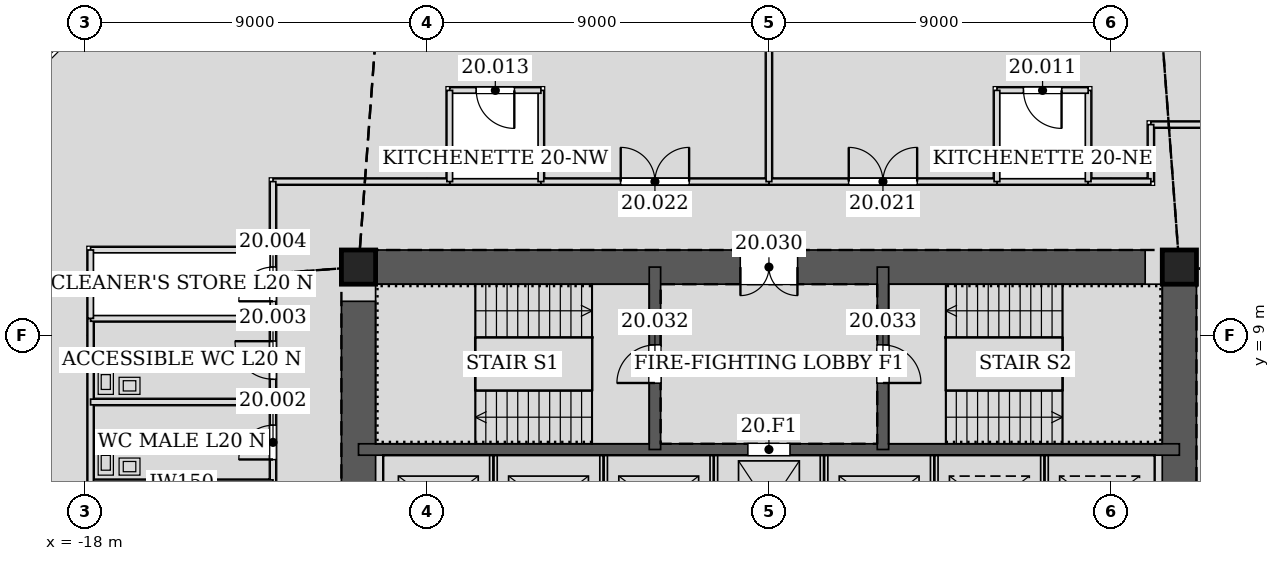
"""IFC4 building model, lengths in metres.
Left out: names, types, materials, properties, quantities, classifications, styles, units other than length and angle.
Written with IfcOpenShell. Run it as: python <this file> out.ifc"""

import sys

from ifc_helpers import new_model, si_unit, direction, frame, frame_2d, origin, origin_2d, place, context, subcontext, project, spatial, rectangle, hollow_rectangle, extrude, element, fill, save


model = new_model("IFC4")
c1 = context("Model", 3, precision=1e-05, world=origin(), true_north=direction((0.0, 1.0)))
c2 = subcontext(c1, "Body", "Model", "MODEL_VIEW")
j1 = project(units=[si_unit("LENGTHUNIT", "METRE"), si_unit("PLANEANGLEUNIT", "RADIAN")], contexts=[c1])
p1 = place(None, origin())
s1 = spatial("IfcSite", under=j1, at=p1, CompositionType="ELEMENT")
p2 = place(p1, origin())
s2 = spatial("IfcBuilding", under=s1, at=p2, CompositionType="ELEMENT")
p3 = place(p2, frame((0.0, 0.0, 91.8)))
s3 = spatial("IfcBuildingStorey", under=s2, at=p3, CompositionType="ELEMENT", Elevation=91.8)
for number, where, z_axis, x_axis in (
    (1, (10.8, 10.8, 0.0), (0.0, 0.0, 1.0), (1.0, 0.0, 0.0)),
    (2, (-10.8, 10.8, 0.0), (0.0, 0.0, 1.0), (1.0, 0.0, 0.0)),
):
    element("IfcColumn", number, at=place(p3, frame(where, z_axis=z_axis, x_axis=x_axis)), inside=s3, PredefinedType="COLUMN", context=c2, shape_type="SweptSolid", body=[
        extrude(hollow_rectangle(XDim=0.9, YDim=0.9, WallThickness=0.06, at=origin_2d()), origin(), (0.0, 0.0, 1.0), 4.2),
    ])
p4 = place(p3, frame((10.8, -10.8, 0.0), z_axis=(0.0, 0.0, 1.0), x_axis=(0.0, 1.0, 0.0)))
e3 = element("IfcWall", 3, at=p4, inside=s3, PredefinedType="SOLIDWALL", context=c2, shape_type="SweptSolid", body=[
    extrude(rectangle(XDim=21.6, YDim=0.9, at=frame_2d((10.8, 0.0))), origin(), (0.0, 0.0, 1.0), 4.2),
])
p5 = place(p4, frame((11.7, 0.0, 0.0)))
e4 = element("IfcOpeningElement", 4, at=p5, cuts=e3, PredefinedType="OPENING", context=c2, shape_type="SweptSolid", body=[
    extrude(rectangle(XDim=1.2, YDim=2.1, at=frame_2d((0.6, 1.05))), frame((0.0, 0.46, 0.0), z_axis=(0.0, -1.0, 0.0), x_axis=(1.0, 0.0, 0.0)), (0.0, 0.0, 1.0), 0.92),
])
p6 = place(p4, frame((8.7, 0.0, 0.0)))
e5 = element("IfcOpeningElement", 5, at=p6, cuts=e3, PredefinedType="OPENING", context=c2, shape_type="SweptSolid", body=[
    extrude(rectangle(XDim=1.2, YDim=2.1, at=frame_2d((0.6, 1.05))), frame((0.0, 0.46, 0.0), z_axis=(0.0, -1.0, 0.0), x_axis=(1.0, 0.0, 0.0)), (0.0, 0.0, 1.0), 0.92),
])
p7 = place(p3, frame((10.8, 10.8, 0.0), z_axis=(0.0, 0.0, 1.0), x_axis=(-1.0, 0.0, 0.0)))
e6 = element("IfcWall", 6, at=p7, inside=s3, PredefinedType="SOLIDWALL", context=c2, shape_type="SweptSolid", body=[
    extrude(rectangle(XDim=21.6, YDim=0.9, at=frame_2d((10.8, 0.0))), origin(), (0.0, 0.0, 1.0), 4.2),
])
p8 = place(p7, frame((10.05, 0.0, 0.0)))
e7 = element("IfcOpeningElement", 7, at=p8, cuts=e6, PredefinedType="OPENING", context=c2, shape_type="SweptSolid", body=[
    extrude(rectangle(XDim=1.5, YDim=2.1, at=frame_2d((0.75, 1.05))), frame((0.0, 0.46, 0.0), z_axis=(0.0, -1.0, 0.0), x_axis=(1.0, 0.0, 0.0)), (0.0, 0.0, 1.0), 0.92),
])
p9 = place(p3, frame((-10.8, 10.8, 0.0), z_axis=(0.0, 0.0, 1.0), x_axis=(0.0, -1.0, 0.0)))
e8 = element("IfcWall", 8, at=p9, inside=s3, PredefinedType="SOLIDWALL", context=c2, shape_type="SweptSolid", body=[
    extrude(rectangle(XDim=21.6, YDim=0.9, at=frame_2d((10.8, 0.0))), origin(), (0.0, 0.0, 1.0), 4.2),
])
p10 = place(p9, frame((8.7, 0.0, 0.0)))
e9 = element("IfcOpeningElement", 9, at=p10, cuts=e8, PredefinedType="OPENING", context=c2, shape_type="SweptSolid", body=[
    extrude(rectangle(XDim=1.2, YDim=2.1, at=frame_2d((0.6, 1.05))), frame((0.0, 0.46, 0.0), z_axis=(0.0, -1.0, 0.0), x_axis=(1.0, 0.0, 0.0)), (0.0, 0.0, 1.0), 0.92),
])
p11 = place(p9, frame((11.7, 0.0, 0.0)))
e10 = element("IfcOpeningElement", 10, at=p11, cuts=e8, PredefinedType="OPENING", context=c2, shape_type="SweptSolid", body=[
    extrude(rectangle(XDim=1.2, YDim=2.1, at=frame_2d((0.6, 1.05))), frame((0.0, 0.46, 0.0), z_axis=(0.0, -1.0, 0.0), x_axis=(1.0, 0.0, 0.0)), (0.0, 0.0, 1.0), 0.92),
])
p12 = place(p3, frame((-10.8, 6.0, 0.0), z_axis=(0.0, 0.0, 1.0), x_axis=(1.0, 0.0, 0.0)))
e11 = element("IfcWall", 11, at=p12, inside=s3, PredefinedType="SOLIDWALL", context=c2, shape_type="SweptSolid", body=[
    extrude(rectangle(XDim=21.6, YDim=0.3, at=frame_2d((10.8, 0.0))), origin(), (0.0, 0.0, 1.0), 4.2),
])
p13 = place(p12, frame((10.25, 0.0, 0.0)))
e12 = element("IfcOpeningElement", 12, at=p13, cuts=e11, PredefinedType="OPENING", context=c2, shape_type="SweptSolid", body=[
    extrude(rectangle(XDim=1.1, YDim=2.1, at=frame_2d((0.55, 1.05))), frame((0.0, 0.16, 0.0), z_axis=(0.0, -1.0, 0.0), x_axis=(1.0, 0.0, 0.0)), (0.0, 0.0, 1.0), 0.32),
])
p14 = place(p3, frame((-3.0, 6.0, 0.0), z_axis=(0.0, 0.0, 1.0), x_axis=(0.0, 1.0, 0.0)))
e13 = element("IfcWall", 13, at=p14, inside=s3, PredefinedType="SOLIDWALL", context=c2, shape_type="SweptSolid", body=[
    extrude(rectangle(XDim=4.8, YDim=0.3, at=frame_2d((2.4, 0.0))), origin(), (0.0, 0.0, 1.0), 4.2),
])
p15 = place(p14, frame((1.75, 0.0, 0.0)))
e14 = element("IfcOpeningElement", 14, at=p15, cuts=e13, PredefinedType="OPENING", context=c2, shape_type="SweptSolid", body=[
    extrude(rectangle(XDim=1.0, YDim=2.1, at=frame_2d((0.5, 1.05))), frame((0.0, 0.16, 0.0), z_axis=(0.0, -1.0, 0.0), x_axis=(1.0, 0.0, 0.0)), (0.0, 0.0, 1.0), 0.32),
])
p16 = place(p3, frame((3.0, 6.0, 0.0), z_axis=(0.0, 0.0, 1.0), x_axis=(0.0, 1.0, 0.0)))
e15 = element("IfcWall", 15, at=p16, inside=s3, PredefinedType="SOLIDWALL", context=c2, shape_type="SweptSolid", body=[
    extrude(rectangle(XDim=4.8, YDim=0.3, at=frame_2d((2.4, 0.0))), origin(), (0.0, 0.0, 1.0), 4.2),
])
p17 = place(p16, frame((1.75, 0.0, 0.0)))
e16 = element("IfcOpeningElement", 16, at=p17, cuts=e15, PredefinedType="OPENING", context=c2, shape_type="SweptSolid", body=[
    extrude(rectangle(XDim=1.0, YDim=2.1, at=frame_2d((0.5, 1.05))), frame((0.0, 0.16, 0.0), z_axis=(0.0, -1.0, 0.0), x_axis=(1.0, 0.0, 0.0)), (0.0, 0.0, 1.0), 0.32),
])
p18 = place(p3, frame((-13.05, 7.251, 0.0), z_axis=(0.0, 0.0, 1.0), x_axis=(0.0, -1.0, 0.0)))
e17 = element("IfcWall", 17, at=p18, inside=s3, PredefinedType="PARTITIONING", context=c2, shape_type="SweptSolid", body=[
    extrude(rectangle(XDim=2.127, YDim=0.15, at=frame_2d((1.063, 0.0))), origin(), (0.0, 0.0, 1.0), 4.035),
])
p19 = place(p18, frame((0.614, 0.0, 0.0)))
e18 = element("IfcOpeningElement", 18, at=p19, cuts=e17, PredefinedType="OPENING", context=c2, shape_type="SweptSolid", body=[
    extrude(rectangle(XDim=0.9, YDim=2.1, at=frame_2d((0.45, 1.05))), frame((0.0, 0.085, 0.0), z_axis=(0.0, -1.0, 0.0), x_axis=(1.0, 0.0, 0.0)), (0.0, 0.0, 1.0), 0.17),
])
p20 = place(p3, frame((-13.05, 9.451, 0.0), z_axis=(0.0, 0.0, 1.0), x_axis=(0.0, -1.0, 0.0)))
e19 = element("IfcWall", 19, at=p20, inside=s3, PredefinedType="PARTITIONING", context=c2, shape_type="SweptSolid", body=[
    extrude(rectangle(XDim=2.202, YDim=0.15, at=frame_2d((1.101, 0.0))), origin(), (0.0, 0.0, 1.0), 4.035),
])
p21 = place(p20, frame((0.601, 0.0, 0.0)))
e20 = element("IfcOpeningElement", 20, at=p21, cuts=e19, PredefinedType="OPENING", context=c2, shape_type="SweptSolid", body=[
    extrude(rectangle(XDim=1.0, YDim=2.1, at=frame_2d((0.5, 1.05))), frame((0.0, 0.085, 0.0), z_axis=(0.0, -1.0, 0.0), x_axis=(1.0, 0.0, 0.0)), (0.0, 0.0, 1.0), 0.17),
])
p22 = place(p3, frame((-13.05, 11.251, 0.0), z_axis=(0.0, 0.0, 1.0), x_axis=(0.0, -1.0, 0.0)))
e21 = element("IfcWall", 21, at=p22, inside=s3, PredefinedType="PARTITIONING", context=c2, shape_type="SweptSolid", body=[
    extrude(rectangle(XDim=1.802, YDim=0.15, at=frame_2d((0.901, 0.0))), origin(), (0.0, 0.0, 1.0), 3.014),
])
p23 = place(p22, frame((0.451, 0.0, 0.0)))
e22 = element("IfcOpeningElement", 22, at=p23, cuts=e21, PredefinedType="OPENING", context=c2, shape_type="SweptSolid", body=[
    extrude(rectangle(XDim=0.9, YDim=2.1, at=frame_2d((0.45, 1.05))), frame((0.0, 0.085, 0.0), z_axis=(0.0, -1.0, 0.0), x_axis=(1.0, 0.0, 0.0)), (0.0, 0.0, 1.0), 0.17),
])
for number, where, z_axis, x_axis in (
    (23, (8.401, 13.05, 0.0), (0.0, 0.0, 1.0), (-1.0, 0.0, 0.0)),
    (24, (-5.999, 13.05, 0.0), (0.0, 0.0, 1.0), (-1.0, 0.0, 0.0)),
):
    element("IfcWall", number, at=place(p3, frame(where, z_axis=z_axis, x_axis=x_axis)), inside=s3, PredefinedType="PARTITIONING", context=c2, shape_type="SweptSolid", body=[
        extrude(rectangle(XDim=2.402, YDim=0.15, at=frame_2d((1.201, 0.0))), origin(), (0.0, 0.0, 1.0), 4.035),
    ])
p24 = place(p3, frame((6.001, 13.05, 0.0), z_axis=(0.0, 0.0, 1.0), x_axis=(-1.0, 0.0, 0.0)))
e25 = element("IfcWall", 25, at=p24, inside=s3, PredefinedType="PARTITIONING", context=c2, shape_type="SweptSolid", body=[
    extrude(rectangle(XDim=6.002, YDim=0.15, at=frame_2d((3.001, 0.0))), origin(), (0.0, 0.0, 1.0), 3.065),
])
p25 = place(p24, frame((2.101, 0.0, 0.0)))
e26 = element("IfcOpeningElement", 26, at=p25, cuts=e25, PredefinedType="OPENING", context=c2, shape_type="SweptSolid", body=[
    extrude(rectangle(XDim=1.8, YDim=2.4, at=frame_2d((0.9, 1.2))), frame((0.0, 0.085, 0.0), z_axis=(0.0, -1.0, 0.0), x_axis=(1.0, 0.0, 0.0)), (0.0, 0.0, 1.0), 0.17),
])
p26 = place(p3, frame((14.55, 14.55, 0.0), z_axis=(0.0, 0.0, 1.0), x_axis=(-1.0, 0.0, 0.0)))
e27 = element("IfcWall", 27, at=p26, inside=s3, PredefinedType="PARTITIONING", context=c2, shape_type="SweptSolid", body=[
    extrude(rectangle(XDim=4.5, YDim=0.15, at=frame_2d((2.25, 0.0))), origin(), (0.0, 0.0, 1.0), 3.014),
])
p27 = place(p3, frame((10.05, 14.55, 0.0), z_axis=(0.0, 0.0, 1.0), x_axis=(0.0, -1.0, 0.0)))
e28 = element("IfcWall", 28, at=p27, inside=s3, PredefinedType="PARTITIONING", context=c2, shape_type="SweptSolid", body=[
    extrude(rectangle(XDim=1.5, YDim=0.15, at=frame_2d((0.75, 0.0))), origin(), (0.0, 0.0, 1.0), 3.491),
])
p28 = place(p3, frame((10.05, 13.05, 0.0), z_axis=(0.0, 0.0, 1.0), x_axis=(-1.0, 0.0, 0.0)))
e29 = element("IfcWall", 29, at=p28, inside=s3, PredefinedType="PARTITIONING", context=c2, shape_type="SweptSolid", body=[
    extrude(rectangle(XDim=1.651, YDim=0.15, at=frame_2d((0.826, 0.0))), origin(), (0.0, 0.0, 1.0), 4.035),
])
p29 = place(p3, frame((-8.399, 13.05, 0.0), z_axis=(0.0, 0.0, 1.0), x_axis=(-1.0, 0.0, 0.0)))
e30 = element("IfcWall", 30, at=p29, inside=s3, PredefinedType="PARTITIONING", context=c2, shape_type="SweptSolid", body=[
    extrude(rectangle(XDim=4.651, YDim=0.15, at=frame_2d((2.326, 0.0))), origin(), (0.0, 0.0, 1.0), 3.014),
])
p30 = place(p3, frame((-13.05, 13.05, 0.0), z_axis=(0.0, 0.0, 1.0), x_axis=(0.0, -1.0, 0.0)))
e31 = element("IfcWall", 31, at=p30, inside=s3, PredefinedType="PARTITIONING", context=c2, shape_type="SweptSolid", body=[
    extrude(rectangle(XDim=1.801, YDim=0.15, at=frame_2d((0.9, 0.0))), origin(), (0.0, 0.0, 1.0), 3.179),
])
p31 = place(p3, frame((0.001, 13.05, 0.0), z_axis=(0.0, 0.0, 1.0), x_axis=(-1.0, 0.0, 0.0)))
e32 = element("IfcWall", 32, at=p31, inside=s3, PredefinedType="PARTITIONING", context=c2, shape_type="SweptSolid", body=[
    extrude(rectangle(XDim=6.002, YDim=0.15, at=frame_2d((3.001, 0.0))), origin(), (0.0, 0.0, 1.0), 3.065),
])
p32 = place(p31, frame((2.101, 0.0, 0.0)))
e33 = element("IfcOpeningElement", 33, at=p32, cuts=e32, PredefinedType="OPENING", context=c2, shape_type="SweptSolid", body=[
    extrude(rectangle(XDim=1.8, YDim=2.4, at=frame_2d((0.9, 1.2))), frame((0.0, 0.085, 0.0), z_axis=(0.0, -1.0, 0.0), x_axis=(1.0, 0.0, 0.0)), (0.0, 0.0, 1.0), 0.17),
])
p33 = place(p3, frame((-13.05, 5.125, 0.0), z_axis=(0.0, 0.0, 1.0), x_axis=(-1.0, 0.0, 0.0)))
e34 = element("IfcWall", 34, at=p33, inside=s3, PredefinedType="PARTITIONING", context=c2, shape_type="SweptSolid", body=[
    extrude(rectangle(XDim=4.8, YDim=0.15, at=frame_2d((2.4, 0.0))), origin(), (0.0, 0.0, 1.0), 3.491),
])
p34 = place(p3, frame((-17.85, 3.0, 0.0), z_axis=(0.0, 0.0, 1.0), x_axis=(0.0, 1.0, 0.0)))
e35 = element("IfcWall", 35, at=p34, inside=s3, PredefinedType="PARTITIONING", context=c2, shape_type="SweptSolid", body=[
    extrude(rectangle(XDim=6.45, YDim=0.15, at=frame_2d((3.225, 0.0))), origin(), (0.0, 0.0, 1.0), 4.035),
])
for number, where, z_axis, x_axis in (
    (36, (-13.05, 7.25, 0.0), (0.0, 0.0, 1.0), (-1.0, 0.0, 0.0)),
    (37, (-13.05, 9.45, 0.0), (0.0, 0.0, 1.0), (-1.0, 0.0, 0.0)),
):
    element("IfcWall", number, at=place(p3, frame(where, z_axis=z_axis, x_axis=x_axis)), inside=s3, PredefinedType="PARTITIONING", context=c2, shape_type="SweptSolid", body=[
        extrude(rectangle(XDim=4.8, YDim=0.15, at=frame_2d((2.4, 0.0))), origin(), (0.0, 0.0, 1.0), 3.491),
    ])
p35 = place(p3, frame((-13.05, 11.25, 0.0), z_axis=(0.0, 0.0, 1.0), x_axis=(-1.0, 0.0, 0.0)))
e38 = element("IfcWall", 38, at=p35, inside=s3, PredefinedType="PARTITIONING", context=c2, shape_type="SweptSolid", body=[
    extrude(rectangle(XDim=4.8, YDim=0.15, at=frame_2d((2.4, 0.0))), origin(), (0.0, 0.0, 1.0), 3.715),
])
p36 = place(p3, frame((-17.85, 11.25, 0.0), z_axis=(0.0, 0.0, 1.0), x_axis=(0.0, -1.0, 0.0)))
e39 = element("IfcWall", 39, at=p36, inside=s3, PredefinedType="PARTITIONING", context=c2, shape_type="SweptSolid", body=[
    extrude(rectangle(XDim=1.8, YDim=0.15, at=frame_2d((0.9, 0.0))), origin(), (0.0, 0.0, 1.0), 3.014),
])
p37 = place(p3, frame((8.4, 13.05, 0.0), z_axis=(0.0, 0.0, 1.0), x_axis=(0.0, 1.0, 0.0)))
e40 = element("IfcWall", 40, at=p37, inside=s3, PredefinedType="PARTITIONING", context=c2, shape_type="SweptSolid", body=[
    extrude(rectangle(XDim=2.4, YDim=0.15, at=frame_2d((1.2, 0.0))), origin(), (0.0, 0.0, 1.0), 3.491),
])
p38 = place(p3, frame((8.4, 15.45, 0.0), z_axis=(0.0, 0.0, 1.0), x_axis=(-1.0, 0.0, 0.0)))
e41 = element("IfcWall", 41, at=p38, inside=s3, PredefinedType="PARTITIONING", context=c2, shape_type="SweptSolid", body=[
    extrude(rectangle(XDim=2.4, YDim=0.15, at=frame_2d((1.2, 0.0))), origin(), (0.0, 0.0, 1.0), 4.035),
])
p39 = place(p38, frame((0.7, 0.0, 0.0)))
e42 = element("IfcOpeningElement", 42, at=p39, cuts=e41, PredefinedType="OPENING", context=c2, shape_type="SweptSolid", body=[
    extrude(rectangle(XDim=1.0, YDim=2.1, at=frame_2d((0.5, 1.05))), frame((0.0, 0.085, 0.0), z_axis=(0.0, -1.0, 0.0), x_axis=(1.0, 0.0, 0.0)), (0.0, 0.0, 1.0), 0.17),
])
for number, where, z_axis, x_axis in (
    (43, (6.0, 15.45, 0.0), (0.0, 0.0, 1.0), (0.0, -1.0, 0.0)),
    (44, (-6.0, 13.05, 0.0), (0.0, 0.0, 1.0), (0.0, 1.0, 0.0)),
):
    element("IfcWall", number, at=place(p3, frame(where, z_axis=z_axis, x_axis=x_axis)), inside=s3, PredefinedType="PARTITIONING", context=c2, shape_type="SweptSolid", body=[
        extrude(rectangle(XDim=2.4, YDim=0.15, at=frame_2d((1.2, 0.0))), origin(), (0.0, 0.0, 1.0), 3.491),
    ])
p40 = place(p3, frame((-6.0, 15.45, 0.0), z_axis=(0.0, 0.0, 1.0), x_axis=(-1.0, 0.0, 0.0)))
e45 = element("IfcWall", 45, at=p40, inside=s3, PredefinedType="PARTITIONING", context=c2, shape_type="SweptSolid", body=[
    extrude(rectangle(XDim=2.4, YDim=0.15, at=frame_2d((1.2, 0.0))), origin(), (0.0, 0.0, 1.0), 4.035),
])
p41 = place(p40, frame((0.7, 0.0, 0.0)))
e46 = element("IfcOpeningElement", 46, at=p41, cuts=e45, PredefinedType="OPENING", context=c2, shape_type="SweptSolid", body=[
    extrude(rectangle(XDim=1.0, YDim=2.1, at=frame_2d((0.5, 1.05))), frame((0.0, 0.085, 0.0), z_axis=(0.0, -1.0, 0.0), x_axis=(1.0, 0.0, 0.0)), (0.0, 0.0, 1.0), 0.17),
])
p42 = place(p3, frame((-8.4, 15.45, 0.0), z_axis=(0.0, 0.0, 1.0), x_axis=(0.0, -1.0, 0.0)))
e47 = element("IfcWall", 47, at=p42, inside=s3, PredefinedType="PARTITIONING", context=c2, shape_type="SweptSolid", body=[
    extrude(rectangle(XDim=2.4, YDim=0.15, at=frame_2d((1.2, 0.0))), origin(), (0.0, 0.0, 1.0), 3.491),
])
p43 = place(p3, frame((0.0, 24.23, 0.0), z_axis=(0.0, 0.0, 1.0), x_axis=(0.0, -1.0, 0.0)))
e48 = element("IfcWall", 48, at=p43, inside=s3, PredefinedType="PARTITIONING", context=c2, shape_type="SweptSolid", body=[
    extrude(rectangle(XDim=11.18, YDim=0.15, at=frame_2d((5.59, 0.0))), origin(), (0.0, 0.0, 1.0), 3.065),
])
for number, where, z_axis, x_axis in (
    (49, (-7.25, 3.15, 0.0), (0.0, 0.0, 1.0), (0.0, 1.0, 0.0)),
    (50, (-4.35, 3.15, 0.0), (0.0, 0.0, 1.0), (0.0, 1.0, 0.0)),
    (51, (-1.45, 3.15, 0.0), (0.0, 0.0, 1.0), (0.0, 1.0, 0.0)),
    (52, (1.45, 3.15, 0.0), (0.0, 0.0, 1.0), (0.0, 1.0, 0.0)),
    (53, (4.35, 3.15, 0.0), (0.0, 0.0, 1.0), (0.0, 1.0, 0.0)),
    (54, (7.25, 3.15, 0.0), (0.0, 0.0, 1.0), (0.0, 1.0, 0.0)),
):
    element("IfcWall", number, at=place(p3, frame(where, z_axis=z_axis, x_axis=x_axis)), inside=s3, PredefinedType="PARTITIONING", context=c2, shape_type="SweptSolid", body=[
        extrude(rectangle(XDim=2.7, YDim=0.2, at=frame_2d((1.35, 0.0))), origin(), (0.0, 0.0, 1.0), 4.2),
    ])
p44 = place(p19, frame((0.9, 0.0, 0.0), z_axis=(0.0, 0.0, 1.0), x_axis=(-1.0, 0.0, 0.0)))
e55 = element("IfcDoor", 55, at=p44, inside=s3, OperationType="SINGLE_SWING_LEFT", PredefinedType="DOOR", context=c2, shape_type="SweptSolid", body=[
    extrude(rectangle(XDim=0.9, YDim=2.1, at=frame_2d((0.45, 1.05))), frame((0.0, 0.025, 0.0), z_axis=(0.0, -1.0, 0.0), x_axis=(1.0, 0.0, 0.0)), (0.0, 0.0, 1.0), 0.05),
])
fill(e18, e55)
p45 = place(p21, frame((1.0, 0.0, 0.0), z_axis=(0.0, 0.0, 1.0), x_axis=(-1.0, 0.0, 0.0)))
e56 = element("IfcDoor", 56, at=p45, inside=s3, OperationType="SINGLE_SWING_RIGHT", PredefinedType="DOOR", context=c2, shape_type="SweptSolid", body=[
    extrude(rectangle(XDim=1.0, YDim=2.1, at=frame_2d((0.5, 1.05))), frame((0.0, 0.025, 0.0), z_axis=(0.0, -1.0, 0.0), x_axis=(1.0, 0.0, 0.0)), (0.0, 0.0, 1.0), 0.05),
])
fill(e20, e56)
p46 = place(p23, frame((0.9, 0.0, 0.0), z_axis=(0.0, 0.0, 1.0), x_axis=(-1.0, 0.0, 0.0)))
e57 = element("IfcDoor", 57, at=p46, inside=s3, OperationType="SINGLE_SWING_LEFT", PredefinedType="DOOR", context=c2, shape_type="SweptSolid", body=[
    extrude(rectangle(XDim=0.9, YDim=2.1, at=frame_2d((0.45, 1.05))), frame((0.0, 0.025, 0.0), z_axis=(0.0, -1.0, 0.0), x_axis=(1.0, 0.0, 0.0)), (0.0, 0.0, 1.0), 0.05),
])
fill(e22, e57)
p47 = place(p39, origin())
e58 = element("IfcDoor", 58, at=p47, inside=s3, OperationType="SINGLE_SWING_LEFT", PredefinedType="DOOR", context=c2, shape_type="SweptSolid", body=[
    extrude(rectangle(XDim=1.0, YDim=2.1, at=frame_2d((0.5, 1.05))), frame((0.0, 0.025, 0.0), z_axis=(0.0, -1.0, 0.0), x_axis=(1.0, 0.0, 0.0)), (0.0, 0.0, 1.0), 0.05),
])
fill(e42, e58)
p48 = place(p41, origin())
e59 = element("IfcDoor", 59, at=p48, inside=s3, OperationType="SINGLE_SWING_LEFT", PredefinedType="DOOR", context=c2, shape_type="SweptSolid", body=[
    extrude(rectangle(XDim=1.0, YDim=2.1, at=frame_2d((0.5, 1.05))), frame((0.0, 0.025, 0.0), z_axis=(0.0, -1.0, 0.0), x_axis=(1.0, 0.0, 0.0)), (0.0, 0.0, 1.0), 0.05),
])
fill(e46, e59)
p49 = place(p25, frame((1.8, 0.0, 0.0), z_axis=(0.0, 0.0, 1.0), x_axis=(-1.0, 0.0, 0.0)))
e60 = element("IfcDoor", 60, at=p49, inside=s3, OperationType="DOUBLE_DOOR_SINGLE_SWING", PredefinedType="DOOR", context=c2, shape_type="SweptSolid", body=[
    extrude(rectangle(XDim=1.8, YDim=2.4, at=frame_2d((0.9, 1.2))), frame((0.0, 0.025, 0.0), z_axis=(0.0, -1.0, 0.0), x_axis=(1.0, 0.0, 0.0)), (0.0, 0.0, 1.0), 0.05),
])
fill(e26, e60)
p50 = place(p32, frame((1.8, 0.0, 0.0), z_axis=(0.0, 0.0, 1.0), x_axis=(-1.0, 0.0, 0.0)))
e61 = element("IfcDoor", 61, at=p50, inside=s3, OperationType="DOUBLE_DOOR_SINGLE_SWING", PredefinedType="DOOR", context=c2, shape_type="SweptSolid", body=[
    extrude(rectangle(XDim=1.8, YDim=2.4, at=frame_2d((0.9, 1.2))), frame((0.0, 0.025, 0.0), z_axis=(0.0, -1.0, 0.0), x_axis=(1.0, 0.0, 0.0)), (0.0, 0.0, 1.0), 0.05),
])
fill(e33, e61)
p51 = place(p8, origin())
e62 = element("IfcDoor", 62, at=p51, inside=s3, OperationType="DOUBLE_DOOR_SINGLE_SWING", PredefinedType="DOOR", context=c2, shape_type="SweptSolid", body=[
    extrude(rectangle(XDim=1.5, YDim=2.1, at=frame_2d((0.75, 1.05))), frame((0.0, 0.025, 0.0), z_axis=(0.0, -1.0, 0.0), x_axis=(1.0, 0.0, 0.0)), (0.0, 0.0, 1.0), 0.05),
])
fill(e7, e62)
p52 = place(p15, origin())
e63 = element("IfcDoor", 63, at=p52, inside=s3, OperationType="SINGLE_SWING_LEFT", PredefinedType="DOOR", context=c2, shape_type="SweptSolid", body=[
    extrude(rectangle(XDim=1.0, YDim=2.1, at=frame_2d((0.5, 1.05))), frame((0.0, 0.025, 0.0), z_axis=(0.0, -1.0, 0.0), x_axis=(1.0, 0.0, 0.0)), (0.0, 0.0, 1.0), 0.05),
])
fill(e14, e63)
p53 = place(p17, frame((1.0, 0.0, 0.0), z_axis=(0.0, 0.0, 1.0), x_axis=(-1.0, 0.0, 0.0)))
e64 = element("IfcDoor", 64, at=p53, inside=s3, OperationType="SINGLE_SWING_RIGHT", PredefinedType="DOOR", context=c2, shape_type="SweptSolid", body=[
    extrude(rectangle(XDim=1.0, YDim=2.1, at=frame_2d((0.5, 1.05))), frame((0.0, 0.025, 0.0), z_axis=(0.0, -1.0, 0.0), x_axis=(1.0, 0.0, 0.0)), (0.0, 0.0, 1.0), 0.05),
])
fill(e16, e64)
p54 = place(p13, origin())
e65 = element("IfcDoor", 65, at=p54, inside=s3, OperationType="DOUBLE_DOOR_SLIDING", PredefinedType="DOOR", context=c2, shape_type="SweptSolid", body=[
    extrude(rectangle(XDim=1.1, YDim=2.1, at=frame_2d((0.55, 1.05))), frame((0.0, 0.025, 0.0), z_axis=(0.0, -1.0, 0.0), x_axis=(1.0, 0.0, 0.0)), (0.0, 0.0, 1.0), 0.05),
])
fill(e12, e65)
save(model, sys.argv[1])
